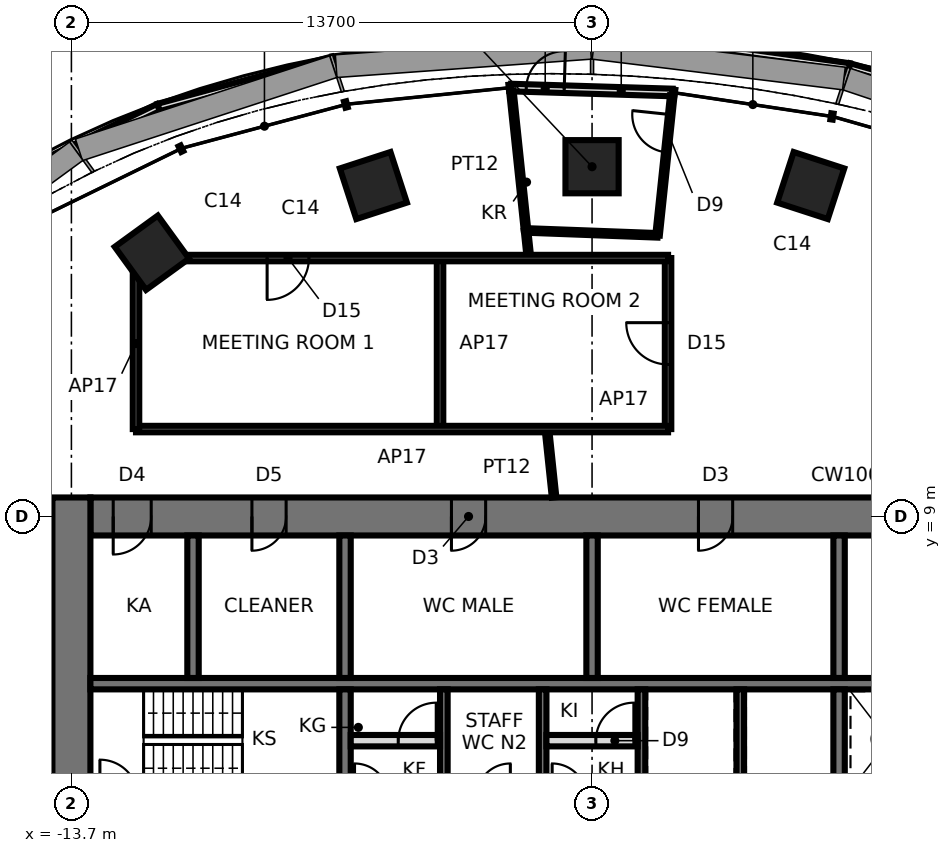
"""IFC4 building model, lengths in metres.
Left out: names, types, materials, properties, quantities, classifications, styles, units other than length and angle.
Written with IfcOpenShell. Run it as: python <this file> out.ifc"""

import sys

from ifc_helpers import new_model, si_unit, direction, frame, frame_2d, origin, origin_2d, place, context, subcontext, project, spatial, rectangle, extrude, element, fill, save


model = new_model("IFC4")
c1 = context("Model", 3, precision=1e-05, world=origin(), true_north=direction((0.0, 1.0)))
c2 = subcontext(c1, "Body", "Model", "MODEL_VIEW")
j1 = project(units=[si_unit("LENGTHUNIT", "METRE"), si_unit("PLANEANGLEUNIT", "RADIAN")], contexts=[c1])
p1 = place(None, origin())
s1 = spatial("IfcSite", under=j1, at=p1, CompositionType="ELEMENT")
p2 = place(p1, origin())
s2 = spatial("IfcBuilding", under=s1, at=p2, CompositionType="ELEMENT")
p3 = place(p2, frame((0.0, 0.0, 172.1)))
s3 = spatial("IfcBuildingStorey", under=s2, at=p3, CompositionType="ELEMENT", Elevation=172.1)
for number, where, z_axis, x_axis in (
    (1, (5.754, 17.708, 0.0), (0.0, 0.0, 1.0), (0.309, 0.951, 0.0)),
    (2, (0.0, 18.204, 0.0), (0.0, 0.0, 1.0), (0.0, 1.0, 0.0)),
    (3, (-5.754, 17.708, 0.0), (0.0, 0.0, 1.0), (-0.309, 0.951, 0.0)),
    (4, (-11.581, 15.94, 0.0), (0.0, 0.0, 1.0), (-0.588, 0.809, 0.0)),
):
    element("IfcColumn", number, at=place(p3, frame(where, z_axis=z_axis, x_axis=x_axis)), inside=s3, PredefinedType="COLUMN", context=c2, shape_type="SweptSolid", body=[
        extrude(rectangle(XDim=1.4, YDim=1.4, at=origin_2d()), origin(), (0.0, 0.0, 1.0), 3.9),
    ])
p4 = place(p3, frame((13.2, 9.0, 0.0), z_axis=(0.0, 0.0, 1.0), x_axis=(-1.0, 0.0, 0.0)))
e5 = element("IfcWall", 5, at=p4, inside=s3, PredefinedType="SHEAR", context=c2, shape_type="SweptSolid", body=[
    extrude(rectangle(XDim=26.4, YDim=1.0, at=frame_2d((13.2, 0.0))), origin(), (0.0, 0.0, 1.0), 3.9),
])
p5 = place(p4, frame((2.65, 0.0, 0.0)))
e6 = element("IfcOpeningElement", 6, at=p5, cuts=e5, PredefinedType="OPENING", context=c2, shape_type="SweptSolid", body=[
    extrude(rectangle(XDim=0.9, YDim=2.1, at=frame_2d((0.45, 1.05))), frame((0.0, 0.51, 0.0), z_axis=(0.0, -1.0, 0.0), x_axis=(1.0, 0.0, 0.0)), (0.0, 0.0, 1.0), 1.02),
])
p6 = place(p4, frame((9.5, 0.0, 0.0)))
e7 = element("IfcOpeningElement", 7, at=p6, cuts=e5, PredefinedType="OPENING", context=c2, shape_type="SweptSolid", body=[
    extrude(rectangle(XDim=0.9, YDim=2.1, at=frame_2d((0.45, 1.05))), frame((0.0, 0.51, 0.0), z_axis=(0.0, -1.0, 0.0), x_axis=(1.0, 0.0, 0.0)), (0.0, 0.0, 1.0), 1.02),
])
p7 = place(p4, frame((16.0, 0.0, 0.0)))
e8 = element("IfcOpeningElement", 8, at=p7, cuts=e5, PredefinedType="OPENING", context=c2, shape_type="SweptSolid", body=[
    extrude(rectangle(XDim=0.9, YDim=2.1, at=frame_2d((0.45, 1.05))), frame((0.0, 0.51, 0.0), z_axis=(0.0, -1.0, 0.0), x_axis=(1.0, 0.0, 0.0)), (0.0, 0.0, 1.0), 1.02),
])
p8 = place(p4, frame((21.25, 0.0, 0.0)))
e9 = element("IfcOpeningElement", 9, at=p8, cuts=e5, PredefinedType="OPENING", context=c2, shape_type="SweptSolid", body=[
    extrude(rectangle(XDim=0.9, YDim=2.1, at=frame_2d((0.45, 1.05))), frame((0.0, 0.51, 0.0), z_axis=(0.0, -1.0, 0.0), x_axis=(1.0, 0.0, 0.0)), (0.0, 0.0, 1.0), 1.02),
])
p9 = place(p4, frame((24.8, 0.0, 0.0)))
e10 = element("IfcOpeningElement", 10, at=p9, cuts=e5, PredefinedType="OPENING", context=c2, shape_type="SweptSolid", body=[
    extrude(rectangle(XDim=1.0, YDim=2.1, at=frame_2d((0.5, 1.05))), frame((0.0, 0.51, 0.0), z_axis=(0.0, -1.0, 0.0), x_axis=(1.0, 0.0, 0.0)), (0.0, 0.0, 1.0), 1.02),
])
p10 = place(p3, frame((-13.7, 9.5, 0.0), z_axis=(0.0, 0.0, 1.0), x_axis=(0.0, -1.0, 0.0)))
e11 = element("IfcWall", 11, at=p10, inside=s3, PredefinedType="SHEAR", context=c2, shape_type="SweptSolid", body=[
    extrude(rectangle(XDim=19.0, YDim=1.0, at=frame_2d((9.5, 0.0))), origin(), (0.0, 0.0, 1.0), 3.9),
])
p11 = place(p10, frame((8.6, 0.0, 0.0)))
e12 = element("IfcOpeningElement", 12, at=p11, cuts=e11, PredefinedType="OPENING", context=c2, shape_type="SweptSolid", body=[
    extrude(rectangle(XDim=1.8, YDim=2.4, at=frame_2d((0.9, 1.2))), frame((0.0, 0.51, 0.0), z_axis=(0.0, -1.0, 0.0), x_axis=(1.0, 0.0, 0.0)), (0.0, 0.0, 1.0), 1.02),
])
p12 = place(p3, frame((-13.2, 4.6, 0.0), z_axis=(0.0, 0.0, 1.0), x_axis=(1.0, 0.0, 0.0)))
e13 = element("IfcWall", 13, at=p12, inside=s3, PredefinedType="SHEAR", context=c2, shape_type="SweptSolid", body=[
    extrude(rectangle(XDim=26.4, YDim=0.3, at=frame_2d((13.2, 0.0))), origin(), (0.0, 0.0, 1.0), 3.9),
])
p13 = place(p3, frame((-6.5, 1.75, 0.0), z_axis=(0.0, 0.0, 1.0), x_axis=(0.0, 1.0, 0.0)))
e14 = element("IfcWall", 14, at=p13, inside=s3, PredefinedType="SHEAR", context=c2, shape_type="SweptSolid", body=[
    extrude(rectangle(XDim=2.7, YDim=0.3, at=frame_2d((1.35, 0.0))), origin(), (0.0, 0.0, 1.0), 3.9),
])
p14 = place(p3, frame((-6.5, 4.75, 0.0), z_axis=(0.0, 0.0, 1.0), x_axis=(0.0, 1.0, 0.0)))
e15 = element("IfcWall", 15, at=p14, inside=s3, PredefinedType="SHEAR", context=c2, shape_type="SweptSolid", body=[
    extrude(rectangle(XDim=3.75, YDim=0.3, at=frame_2d((1.875, 0.0))), origin(), (0.0, 0.0, 1.0), 3.9),
])
p15 = place(p3, frame((6.5, 1.75, 0.0), z_axis=(0.0, 0.0, 1.0), x_axis=(0.0, 1.0, 0.0)))
e16 = element("IfcWall", 16, at=p15, inside=s3, PredefinedType="SHEAR", context=c2, shape_type="SweptSolid", body=[
    extrude(rectangle(XDim=2.7, YDim=0.3, at=frame_2d((1.35, 0.0))), origin(), (0.0, 0.0, 1.0), 3.9),
])
p16 = place(p3, frame((6.5, 4.75, 0.0), z_axis=(0.0, 0.0, 1.0), x_axis=(0.0, 1.0, 0.0)))
e17 = element("IfcWall", 17, at=p16, inside=s3, PredefinedType="SHEAR", context=c2, shape_type="SweptSolid", body=[
    extrude(rectangle(XDim=3.75, YDim=0.3, at=frame_2d((1.875, 0.0))), origin(), (0.0, 0.0, 1.0), 3.9),
])
for number, where, z_axis, x_axis in (
    (18, (-3.9, 1.75, 0.0), (0.0, 0.0, 1.0), (0.0, 1.0, 0.0)),
    (19, (-1.3, 1.75, 0.0), (0.0, 0.0, 1.0), (0.0, 1.0, 0.0)),
    (20, (1.3, 1.75, 0.0), (0.0, 0.0, 1.0), (0.0, 1.0, 0.0)),
    (21, (3.9, 1.75, 0.0), (0.0, 0.0, 1.0), (0.0, 1.0, 0.0)),
):
    element("IfcWall", number, at=place(p3, frame(where, z_axis=z_axis, x_axis=x_axis)), inside=s3, PredefinedType="SHEAR", context=c2, shape_type="SweptSolid", body=[
        extrude(rectangle(XDim=2.7, YDim=0.2, at=frame_2d((1.35, 0.0))), origin(), (0.0, 0.0, 1.0), 3.9),
    ])
for number, where, z_axis, x_axis in (
    (22, (0.0, 4.75, 0.0), (0.0, 0.0, 1.0), (0.0, 1.0, 0.0)),
    (23, (-10.5, 4.75, 0.0), (0.0, 0.0, 1.0), (0.0, 1.0, 0.0)),
):
    element("IfcWall", number, at=place(p3, frame(where, z_axis=z_axis, x_axis=x_axis)), inside=s3, PredefinedType="SHEAR", context=c2, shape_type="SweptSolid", body=[
        extrude(rectangle(XDim=3.75, YDim=0.3, at=frame_2d((1.875, 0.0))), origin(), (0.0, 0.0, 1.0), 3.9),
    ])
p17 = place(p3, frame((2.119, 20.157, 0.0), z_axis=(0.0, 0.0, 1.0), x_axis=(-0.999538806148, 0.030367334508, 0.0)))
e24 = element("IfcWall", 24, at=p17, inside=s3, PredefinedType="SOLIDWALL", context=c2, shape_type="SweptSolid", body=[
    extrude(rectangle(XDim=4.253, YDim=0.2, at=frame_2d((2.126, 0.0))), origin(), (0.0, 0.0, 1.0), 3.28),
])
p18 = place(p17, frame((2.853, 0.0, 0.0)))
e25 = element("IfcOpeningElement", 25, at=p18, cuts=e24, PredefinedType="OPENING", context=c2, shape_type="SweptSolid", body=[
    extrude(rectangle(XDim=1.0, YDim=2.1, at=frame_2d((0.5, 1.05))), frame((0.0, 0.11, 0.0), z_axis=(0.0, -1.0, 0.0), x_axis=(1.0, 0.0, 0.0)), (0.0, 0.0, 1.0), 0.22),
])
p19 = place(p3, frame((11.292, 19.558, 0.0), z_axis=(0.0, 0.0, 1.0), x_axis=(-0.962774396335, 0.270306237002, 0.0)))
e26 = element("IfcWall", 26, at=p19, inside=s3, PredefinedType="PARAPET", context=c2, shape_type="SweptSolid", body=[
    extrude(rectangle(XDim=4.699, YDim=0.2, at=frame_2d((2.35, 0.0))), origin(), (0.0, 0.0, 1.0), 1.1),
])
p20 = place(p3, frame((6.767, 20.828, 0.0), z_axis=(0.0, 0.0, 1.0), x_axis=(-0.990633131846, 0.136550350011, 0.0)))
e27 = element("IfcWall", 27, at=p20, inside=s3, PredefinedType="PARAPET", context=c2, shape_type="SweptSolid", body=[
    extrude(rectangle(XDim=4.556, YDim=0.2, at=frame_2d((2.278, 0.0))), origin(), (0.0, 0.0, 1.0), 1.1),
])
p21 = place(p3, frame((-2.262, 21.52, 0.0), z_axis=(0.0, 0.0, 1.0), x_axis=(-0.993712031961, -0.111966055284, 0.0)))
e28 = element("IfcWall", 28, at=p21, inside=s3, PredefinedType="PARAPET", context=c2, shape_type="SweptSolid", body=[
    extrude(rectangle(XDim=4.592, YDim=0.2, at=frame_2d((2.296, 0.0))), origin(), (0.0, 0.0, 1.0), 1.1),
])
p22 = place(p3, frame((-6.825, 21.006, 0.0), z_axis=(0.0, 0.0, 1.0), x_axis=(-0.965105771425, -0.261860363479, 0.0)))
e29 = element("IfcWall", 29, at=p22, inside=s3, PredefinedType="PARAPET", context=c2, shape_type="SweptSolid", body=[
    extrude(rectangle(XDim=4.75, YDim=0.2, at=frame_2d((2.375, 0.0))), origin(), (0.0, 0.0, 1.0), 1.1),
])
p23 = place(p3, frame((-11.41, 19.762, 0.0), z_axis=(0.0, 0.0, 1.0), x_axis=(-0.89948095446, -0.436959966774, 0.0)))
e30 = element("IfcWall", 30, at=p23, inside=s3, PredefinedType="PARAPET", context=c2, shape_type="SweptSolid", body=[
    extrude(rectangle(XDim=4.938, YDim=0.2, at=frame_2d((2.469, 0.0))), origin(), (0.0, 0.0, 1.0), 1.1),
])
p24 = place(p3, frame((-6.35, 3.1, 0.0), z_axis=(0.0, 0.0, 1.0), x_axis=(1.0, 0.0, 0.0)))
e31 = element("IfcWall", 31, at=p24, inside=s3, PredefinedType="PARTITIONING", context=c2, shape_type="SweptSolid", body=[
    extrude(rectangle(XDim=2.35, YDim=0.3, at=frame_2d((1.175, 0.0))), origin(), (0.0, 0.0, 1.0), 3.74),
])
p25 = place(p24, frame((1.25, 0.0, 0.0)))
e32 = element("IfcOpeningElement", 32, at=p25, cuts=e31, PredefinedType="OPENING", context=c2, shape_type="SweptSolid", body=[
    extrude(rectangle(XDim=1.0, YDim=2.4, at=frame_2d((0.5, 1.2))), frame((0.0, 0.16, 0.0), z_axis=(0.0, -1.0, 0.0), x_axis=(1.0, 0.0, 0.0)), (0.0, 0.0, 1.0), 0.32),
])
p26 = place(p3, frame((-1.2, 3.1, 0.0), z_axis=(0.0, 0.0, 1.0), x_axis=(1.0, 0.0, 0.0)))
e33 = element("IfcWall", 33, at=p26, inside=s3, PredefinedType="PARTITIONING", context=c2, shape_type="SweptSolid", body=[
    extrude(rectangle(XDim=2.4, YDim=0.3, at=frame_2d((1.2, 0.0))), origin(), (0.0, 0.0, 1.0), 3.74),
])
p27 = place(p26, frame((1.3, 0.0, 0.0)))
e34 = element("IfcOpeningElement", 34, at=p27, cuts=e33, PredefinedType="OPENING", context=c2, shape_type="SweptSolid", body=[
    extrude(rectangle(XDim=1.0, YDim=2.4, at=frame_2d((0.5, 1.2))), frame((0.0, 0.16, 0.0), z_axis=(0.0, -1.0, 0.0), x_axis=(1.0, 0.0, 0.0)), (0.0, 0.0, 1.0), 0.32),
])
p28 = place(p3, frame((2.0, 11.3, 0.0), z_axis=(0.0, 0.0, 1.0), x_axis=(0.0, 1.0, 0.0)))
e35 = element("IfcWall", 35, at=p28, inside=s3, PredefinedType="PARTITIONING", context=c2, shape_type="SweptSolid", body=[
    extrude(rectangle(XDim=4.5, YDim=0.17, at=frame_2d((2.25, 0.0))), origin(), (0.0, 0.0, 1.0), 3.74),
])
p29 = place(p28, frame((1.7, 0.0, 0.0)))
e36 = element("IfcOpeningElement", 36, at=p29, cuts=e35, PredefinedType="OPENING", context=c2, shape_type="SweptSolid", body=[
    extrude(rectangle(XDim=1.1, YDim=2.4, at=frame_2d((0.55, 1.2))), frame((0.0, 0.095, 0.0), z_axis=(0.0, -1.0, 0.0), x_axis=(1.0, 0.0, 0.0)), (0.0, 0.0, 1.0), 0.19),
])
p30 = place(p3, frame((1.723, 16.398, 0.0), z_axis=(0.0, 0.0, 1.0), x_axis=(0.10458517476, 0.994515933115, 0.0)))
e37 = element("IfcWall", 37, at=p30, inside=s3, PredefinedType="PARTITIONING", context=c2, shape_type="SweptSolid", body=[
    extrude(rectangle(XDim=3.7, YDim=0.12, at=frame_2d((1.85, 0.0))), origin(), (0.0, 0.0, 1.0), 3.74),
])
p31 = place(p30, frame((2.196, 0.0, 0.0)))
e38 = element("IfcOpeningElement", 38, at=p31, cuts=e37, PredefinedType="OPENING", context=c2, shape_type="SweptSolid", body=[
    extrude(rectangle(XDim=1.0, YDim=2.4, at=frame_2d((0.5, 1.2))), frame((0.0, 0.07, 0.0), z_axis=(0.0, -1.0, 0.0), x_axis=(1.0, 0.0, 0.0)), (0.0, 0.0, 1.0), 0.14),
])
p32 = place(p3, frame((-1.737, 16.527, 0.0), z_axis=(0.0, 0.0, 1.0), x_axis=(0.99930426624, -0.037295890845, 0.0)))
e39 = element("IfcWall", 39, at=p32, inside=s3, PredefinedType="PARTITIONING", context=c2, shape_type="SweptSolid", body=[
    extrude(rectangle(XDim=3.463, YDim=0.12, at=frame_2d((1.731, 0.0))), origin(), (0.0, 0.0, 1.0), 3.74),
])
p33 = place(p3, frame((-1.661, 15.8, 0.0), z_axis=(0.0, 0.0, 1.0), x_axis=(-0.104493621772, 0.99452555674, 0.0)))
e40 = element("IfcWall", 40, at=p33, inside=s3, PredefinedType="PARTITIONING", context=c2, shape_type="SweptSolid", body=[
    extrude(rectangle(XDim=0.731, YDim=0.12, at=frame_2d((0.366, 0.0))), origin(), (0.0, 0.0, 1.0), 3.74),
])
p34 = place(p3, frame((-0.999, 9.5, 0.0), z_axis=(0.0, 0.0, 1.0), x_axis=(-0.104537331683, 0.99452096322, 0.0)))
e41 = element("IfcWall", 41, at=p34, inside=s3, PredefinedType="PARTITIONING", context=c2, shape_type="SweptSolid", body=[
    extrude(rectangle(XDim=1.81, YDim=0.12, at=frame_2d((0.905, 0.0))), origin(), (0.0, 0.0, 1.0), 3.74),
])
p35 = place(p3, frame((-2.124, 20.207, 0.0), z_axis=(0.0, 0.0, 1.0), x_axis=(0.104519911488, -0.994522794159, 0.0)))
e42 = element("IfcWall", 42, at=p35, inside=s3, PredefinedType="PARTITIONING", context=c2, shape_type="SweptSolid", body=[
    extrude(rectangle(XDim=3.7, YDim=0.12, at=frame_2d((1.85, 0.0))), origin(), (0.0, 0.0, 1.0), 3.74),
])
p36 = place(p3, frame((-4.0, 15.8, 0.0), z_axis=(0.0, 0.0, 1.0), x_axis=(0.0, -1.0, 0.0)))
e43 = element("IfcWall", 43, at=p36, inside=s3, PredefinedType="PARTITIONING", context=c2, shape_type="SweptSolid", body=[
    extrude(rectangle(XDim=4.5, YDim=0.17, at=frame_2d((2.25, 0.0))), origin(), (0.0, 0.0, 1.0), 3.74),
])
p37 = place(p3, frame((2.0, 15.8, 0.0), z_axis=(0.0, 0.0, 1.0), x_axis=(-1.0, 0.0, 0.0)))
e44 = element("IfcWall", 44, at=p37, inside=s3, PredefinedType="PARTITIONING", context=c2, shape_type="SweptSolid", body=[
    extrude(rectangle(XDim=14.0, YDim=0.17, at=frame_2d((7.0, 0.0))), origin(), (0.0, 0.0, 1.0), 3.74),
])
p38 = place(p37, frame((9.45, 0.0, 0.0)))
e45 = element("IfcOpeningElement", 45, at=p38, cuts=e44, PredefinedType="OPENING", context=c2, shape_type="SweptSolid", body=[
    extrude(rectangle(XDim=1.1, YDim=2.4, at=frame_2d((0.55, 1.2))), frame((0.0, 0.095, 0.0), z_axis=(0.0, -1.0, 0.0), x_axis=(1.0, 0.0, 0.0)), (0.0, 0.0, 1.0), 0.19),
])
p39 = place(p3, frame((-12.0, 11.3, 0.0), z_axis=(0.0, 0.0, 1.0), x_axis=(1.0, 0.0, 0.0)))
e46 = element("IfcWall", 46, at=p39, inside=s3, PredefinedType="PARTITIONING", context=c2, shape_type="SweptSolid", body=[
    extrude(rectangle(XDim=14.0, YDim=0.17, at=frame_2d((7.0, 0.0))), origin(), (0.0, 0.0, 1.0), 3.74),
])
p40 = place(p3, frame((-12.0, 15.8, 0.0), z_axis=(0.0, 0.0, 1.0), x_axis=(0.0, -1.0, 0.0)))
e47 = element("IfcWall", 47, at=p40, inside=s3, PredefinedType="PARTITIONING", context=c2, shape_type="SweptSolid", body=[
    extrude(rectangle(XDim=4.5, YDim=0.17, at=frame_2d((2.25, 0.0))), origin(), (0.0, 0.0, 1.0), 3.74),
])
p41 = place(p18, frame((1.0, 0.0, 0.0), z_axis=(0.0, 0.0, 1.0), x_axis=(-1.0, 0.0, 0.0)))
e48 = element("IfcDoor", 48, at=p41, inside=s3, OperationType="SINGLE_SWING_RIGHT", PredefinedType="DOOR", context=c2, shape_type="SweptSolid", body=[
    extrude(rectangle(XDim=1.0, YDim=2.1, at=frame_2d((0.5, 1.05))), frame((0.0, 0.025, 0.0), z_axis=(0.0, -1.0, 0.0), x_axis=(1.0, 0.0, 0.0)), (0.0, 0.0, 1.0), 0.05),
])
fill(e25, e48)
p42 = place(p25, origin())
e49 = element("IfcDoor", 49, at=p42, inside=s3, OperationType="SINGLE_SWING_RIGHT", PredefinedType="DOOR", context=c2, shape_type="SweptSolid", body=[
    extrude(rectangle(XDim=1.0, YDim=2.4, at=frame_2d((0.5, 1.2))), frame((0.0, 0.025, 0.0), z_axis=(0.0, -1.0, 0.0), x_axis=(1.0, 0.0, 0.0)), (0.0, 0.0, 1.0), 0.05),
])
fill(e32, e49)
p43 = place(p27, origin())
e50 = element("IfcDoor", 50, at=p43, inside=s3, OperationType="SINGLE_SWING_RIGHT", PredefinedType="DOOR", context=c2, shape_type="SweptSolid", body=[
    extrude(rectangle(XDim=1.0, YDim=2.4, at=frame_2d((0.5, 1.2))), frame((0.0, 0.025, 0.0), z_axis=(0.0, -1.0, 0.0), x_axis=(1.0, 0.0, 0.0)), (0.0, 0.0, 1.0), 0.05),
])
fill(e34, e50)
p44 = place(p6, origin())
e51 = element("IfcDoor", 51, at=p44, inside=s3, OperationType="SINGLE_SWING_RIGHT", PredefinedType="DOOR", context=c2, shape_type="SweptSolid", body=[
    extrude(rectangle(XDim=0.82, YDim=2.06, at=frame_2d((0.45, 1.03))), frame((0.0, 0.025, 0.0), z_axis=(0.0, -1.0, 0.0), x_axis=(1.0, 0.0, 0.0)), (0.0, 0.0, 1.0), 0.05),
    extrude(rectangle(XDim=0.04, YDim=2.1, at=frame_2d((0.02, 1.05))), frame((0.0, 0.25, 0.0), z_axis=(0.0, -1.0, 0.0), x_axis=(1.0, 0.0, 0.0)), (0.0, 0.0, 1.0), 0.5),
    extrude(rectangle(XDim=0.04, YDim=2.1, at=frame_2d((0.88, 1.05))), frame((0.0, 0.25, 0.0), z_axis=(0.0, -1.0, 0.0), x_axis=(1.0, 0.0, 0.0)), (0.0, 0.0, 1.0), 0.5),
    extrude(rectangle(XDim=0.82, YDim=0.04, at=frame_2d((0.45, 2.08))), frame((0.0, 0.25, 0.0), z_axis=(0.0, -1.0, 0.0), x_axis=(1.0, 0.0, 0.0)), (0.0, 0.0, 1.0), 0.5),
])
fill(e7, e51)
p45 = place(p7, origin())
e52 = element("IfcDoor", 52, at=p45, inside=s3, OperationType="SINGLE_SWING_RIGHT", PredefinedType="DOOR", context=c2, shape_type="SweptSolid", body=[
    extrude(rectangle(XDim=0.82, YDim=2.06, at=frame_2d((0.45, 1.03))), frame((0.0, 0.025, 0.0), z_axis=(0.0, -1.0, 0.0), x_axis=(1.0, 0.0, 0.0)), (0.0, 0.0, 1.0), 0.05),
    extrude(rectangle(XDim=0.04, YDim=2.1, at=frame_2d((0.02, 1.05))), frame((0.0, 0.25, 0.0), z_axis=(0.0, -1.0, 0.0), x_axis=(1.0, 0.0, 0.0)), (0.0, 0.0, 1.0), 0.5),
    extrude(rectangle(XDim=0.04, YDim=2.1, at=frame_2d((0.88, 1.05))), frame((0.0, 0.25, 0.0), z_axis=(0.0, -1.0, 0.0), x_axis=(1.0, 0.0, 0.0)), (0.0, 0.0, 1.0), 0.5),
    extrude(rectangle(XDim=0.82, YDim=0.04, at=frame_2d((0.45, 2.08))), frame((0.0, 0.25, 0.0), z_axis=(0.0, -1.0, 0.0), x_axis=(1.0, 0.0, 0.0)), (0.0, 0.0, 1.0), 0.5),
])
fill(e8, e52)
p46 = place(p8, origin())
e53 = element("IfcDoor", 53, at=p46, inside=s3, OperationType="SINGLE_SWING_RIGHT", PredefinedType="DOOR", context=c2, shape_type="SweptSolid", body=[
    extrude(rectangle(XDim=0.82, YDim=2.06, at=frame_2d((0.45, 1.03))), frame((0.0, 0.025, 0.0), z_axis=(0.0, -1.0, 0.0), x_axis=(1.0, 0.0, 0.0)), (0.0, 0.0, 1.0), 0.05),
    extrude(rectangle(XDim=0.04, YDim=2.1, at=frame_2d((0.02, 1.05))), frame((0.0, 0.25, 0.0), z_axis=(0.0, -1.0, 0.0), x_axis=(1.0, 0.0, 0.0)), (0.0, 0.0, 1.0), 0.5),
    extrude(rectangle(XDim=0.04, YDim=2.1, at=frame_2d((0.88, 1.05))), frame((0.0, 0.25, 0.0), z_axis=(0.0, -1.0, 0.0), x_axis=(1.0, 0.0, 0.0)), (0.0, 0.0, 1.0), 0.5),
    extrude(rectangle(XDim=0.82, YDim=0.04, at=frame_2d((0.45, 2.08))), frame((0.0, 0.25, 0.0), z_axis=(0.0, -1.0, 0.0), x_axis=(1.0, 0.0, 0.0)), (0.0, 0.0, 1.0), 0.5),
])
fill(e9, e53)
p47 = place(p9, origin())
e54 = element("IfcDoor", 54, at=p47, inside=s3, OperationType="SINGLE_SWING_RIGHT", PredefinedType="DOOR", context=c2, shape_type="SweptSolid", body=[
    extrude(rectangle(XDim=0.92, YDim=2.06, at=frame_2d((0.5, 1.03))), frame((0.0, 0.025, 0.0), z_axis=(0.0, -1.0, 0.0), x_axis=(1.0, 0.0, 0.0)), (0.0, 0.0, 1.0), 0.05),
    extrude(rectangle(XDim=0.04, YDim=2.1, at=frame_2d((0.02, 1.05))), frame((0.0, 0.25, 0.0), z_axis=(0.0, -1.0, 0.0), x_axis=(1.0, 0.0, 0.0)), (0.0, 0.0, 1.0), 0.5),
    extrude(rectangle(XDim=0.04, YDim=2.1, at=frame_2d((0.98, 1.05))), frame((0.0, 0.25, 0.0), z_axis=(0.0, -1.0, 0.0), x_axis=(1.0, 0.0, 0.0)), (0.0, 0.0, 1.0), 0.5),
    extrude(rectangle(XDim=0.92, YDim=0.04, at=frame_2d((0.5, 2.08))), frame((0.0, 0.25, 0.0), z_axis=(0.0, -1.0, 0.0), x_axis=(1.0, 0.0, 0.0)), (0.0, 0.0, 1.0), 0.5),
])
fill(e10, e54)
p48 = place(p31, origin())
e55 = element("IfcDoor", 55, at=p48, inside=s3, OperationType="SINGLE_SWING_RIGHT", PredefinedType="DOOR", context=c2, shape_type="SweptSolid", body=[
    extrude(rectangle(XDim=1.0, YDim=2.4, at=frame_2d((0.5, 1.2))), frame((0.0, 0.025, 0.0), z_axis=(0.0, -1.0, 0.0), x_axis=(1.0, 0.0, 0.0)), (0.0, 0.0, 1.0), 0.05),
])
fill(e38, e55)
p49 = place(p38, origin())
e56 = element("IfcDoor", 56, at=p49, inside=s3, OperationType="SINGLE_SWING_RIGHT", PredefinedType="DOOR", context=c2, shape_type="SweptSolid", body=[
    extrude(rectangle(XDim=1.1, YDim=2.4, at=frame_2d((0.55, 1.2))), frame((0.0, 0.025, 0.0), z_axis=(0.0, -1.0, 0.0), x_axis=(1.0, 0.0, 0.0)), (0.0, 0.0, 1.0), 0.05),
])
fill(e45, e56)
p50 = place(p29, origin())
e57 = element("IfcDoor", 57, at=p50, inside=s3, OperationType="SINGLE_SWING_RIGHT", PredefinedType="DOOR", context=c2, shape_type="SweptSolid", body=[
    extrude(rectangle(XDim=1.1, YDim=2.4, at=frame_2d((0.55, 1.2))), frame((0.0, 0.025, 0.0), z_axis=(0.0, -1.0, 0.0), x_axis=(1.0, 0.0, 0.0)), (0.0, 0.0, 1.0), 0.05),
])
fill(e36, e57)
save(model, sys.argv[1])
